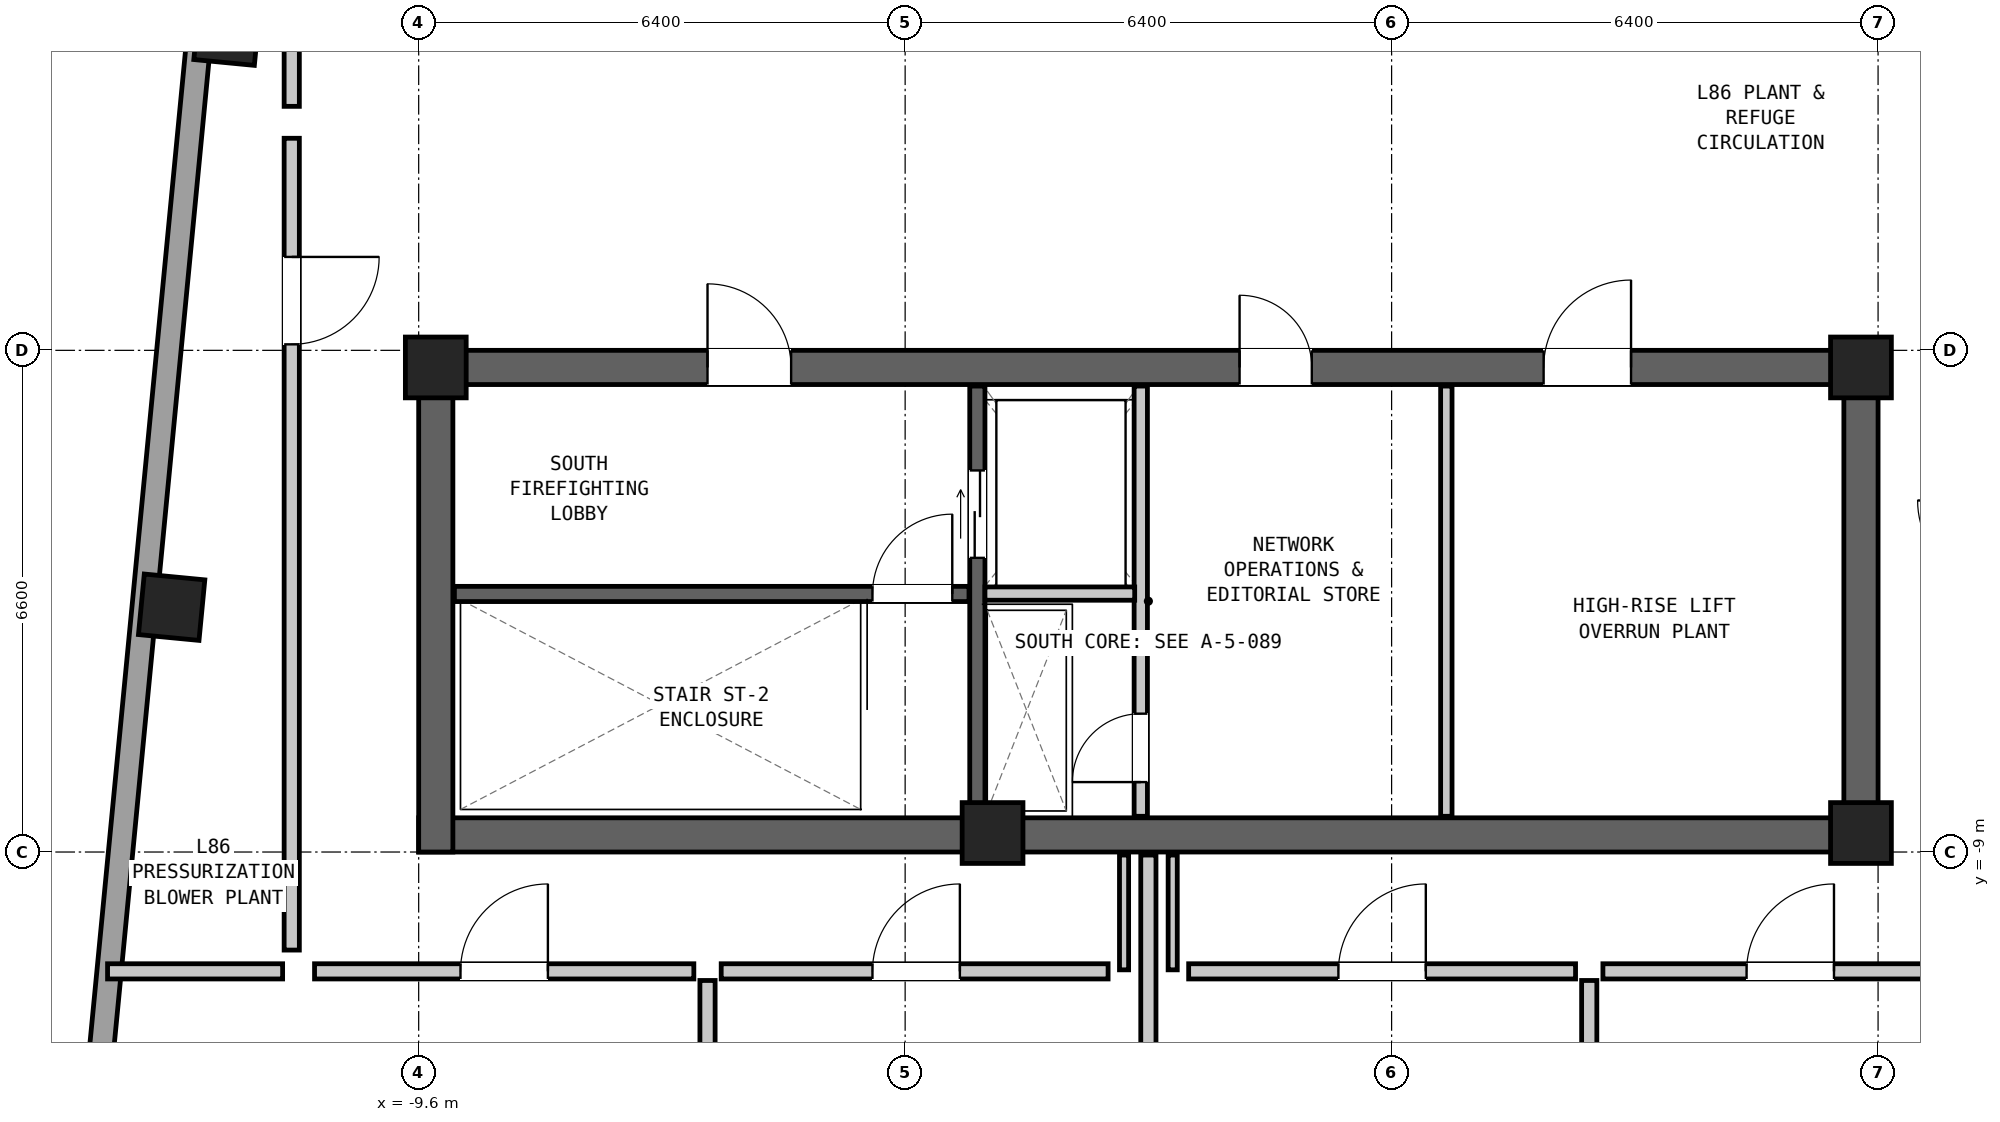
"""IFC4 building model, lengths in metres.
Left out: names, types, materials, properties, quantities, classifications, styles, units other than length and angle.
Written with IfcOpenShell. Run it as: python <this file> out.ifc"""

import sys

from ifc_helpers import new_model, si_unit, direction, frame, frame_2d, origin, origin_2d, place, context, subcontext, project, spatial, rectangle, extrude, element, fill, save


model = new_model("IFC4")
c1 = context("Model", 3, precision=1e-05, world=origin(), true_north=direction((0.0, 1.0)))
c2 = subcontext(c1, "Body", "Model", "MODEL_VIEW")
j1 = project(units=[si_unit("LENGTHUNIT", "METRE"), si_unit("PLANEANGLEUNIT", "RADIAN")], contexts=[c1])
p1 = place(None, origin())
s1 = spatial("IfcSite", under=j1, at=p1, CompositionType="ELEMENT")
p2 = place(p1, origin())
s2 = spatial("IfcBuilding", under=s1, at=p2, CompositionType="ELEMENT")
p3 = place(p2, frame((0.0, 0.0, 292.85)))
s3 = spatial("IfcBuildingStorey", under=s2, at=p3, CompositionType="ELEMENT", Elevation=292.85)
p4 = place(p3, frame((-9.6, -8.775, 0.0), z_axis=(0.0, 0.0, 1.0), x_axis=(1.0, 0.0, 0.0)))
e1 = element("IfcWall", 1, at=p4, inside=s3, PredefinedType="SHEAR", context=c2, shape_type="SweptSolid", body=[
    extrude(rectangle(XDim=19.2, YDim=0.45, at=frame_2d((9.6, 0.0))), origin(), (0.0, 0.0, 1.0), 3.9),
])
p5 = place(p3, frame((-9.6, -2.625, 0.0), z_axis=(0.0, 0.0, 1.0), x_axis=(1.0, 0.0, 0.0)))
e2 = element("IfcWall", 2, at=p5, inside=s3, PredefinedType="SHEAR", context=c2, shape_type="SweptSolid", body=[
    extrude(rectangle(XDim=19.2, YDim=0.45, at=frame_2d((9.6, 0.0))), origin(), (0.0, 0.0, 1.0), 3.9),
])
p6 = place(p5, frame((3.8, 0.0, 0.0)))
e3 = element("IfcOpeningElement", 3, at=p6, cuts=e2, PredefinedType="OPENING", context=c2, shape_type="SweptSolid", body=[
    extrude(rectangle(XDim=1.1, YDim=2.08, at=frame_2d((0.55, 1.04))), frame((0.0, 0.237, 0.0), z_axis=(0.0, -1.0, 0.0), x_axis=(1.0, 0.0, 0.0)), (0.0, 0.0, 1.0), 0.474),
])
p7 = place(p5, frame((10.8, 0.0, 0.0)))
e4 = element("IfcOpeningElement", 4, at=p7, cuts=e2, PredefinedType="OPENING", context=c2, shape_type="SweptSolid", body=[
    extrude(rectangle(XDim=0.95, YDim=2.1, at=frame_2d((0.475, 1.05))), frame((0.0, 0.237, 0.0), z_axis=(0.0, -1.0, 0.0), x_axis=(1.0, 0.0, 0.0)), (0.0, 0.0, 1.0), 0.474),
])
p8 = place(p5, frame((14.8, 0.0, 0.0)))
e5 = element("IfcOpeningElement", 5, at=p8, cuts=e2, PredefinedType="OPENING", context=c2, shape_type="SweptSolid", body=[
    extrude(rectangle(XDim=1.15, YDim=2.1, at=frame_2d((0.575, 1.05))), frame((0.0, 0.237, 0.0), z_axis=(0.0, -1.0, 0.0), x_axis=(1.0, 0.0, 0.0)), (0.0, 0.0, 1.0), 0.474),
])
for number, where, z_axis, x_axis in (
    (6, (-9.375, -9.0, 0.0), (0.0, 0.0, 1.0), (0.0, 1.0, 0.0)),
    (7, (9.375, -9.0, 0.0), (0.0, 0.0, 1.0), (0.0, 1.0, 0.0)),
):
    element("IfcWall", number, at=place(p3, frame(where, z_axis=z_axis, x_axis=x_axis)), inside=s3, PredefinedType="SHEAR", context=c2, shape_type="SweptSolid", body=[
        extrude(rectangle(XDim=6.6, YDim=0.45, at=frame_2d((3.3, 0.0))), origin(), (0.0, 0.0, 1.0), 3.9),
    ])
for number, where, z_axis, x_axis in (
    (8, (-12.122, 1.786, 0.0), (0.0, 0.0, 1.0), (0.096, 0.995, 0.0)),
    (9, (-12.85, -5.779, 0.0), (0.0, 0.0, 1.0), (0.096, 0.995, 0.0)),
    (10, (-9.375, -2.625, 0.0), (0.0, 0.0, 1.0), (1.0, 0.0, 0.0)),
    (11, (9.375, -2.625, 0.0), (0.0, 0.0, 1.0), (1.0, 0.0, 0.0)),
    (12, (-2.05, -8.75, 0.0), (0.0, 0.0, 1.0), (1.0, 0.0, 0.0)),
    (13, (9.375, -8.75, 0.0), (0.0, 0.0, 1.0), (1.0, 0.0, 0.0)),
):
    element("IfcColumn", number, at=place(p3, frame(where, z_axis=z_axis, x_axis=x_axis)), inside=s3, PredefinedType="COLUMN", context=c2, shape_type="SweptSolid", body=[
        extrude(rectangle(XDim=0.8, YDim=0.8, at=origin_2d()), origin(), (0.0, 0.0, 1.0), 3.9),
    ])
p9 = place(p3, frame((-13.9, -12.924, 0.0), z_axis=(0.0, 0.0, 1.0), x_axis=(0.095843788738, 0.995396387456, 0.0)))
e14 = element("IfcWall", 14, at=p9, inside=s3, PredefinedType="SOLIDWALL", context=c2, shape_type="SweptSolid", body=[
    extrude(rectangle(XDim=22.024, YDim=0.32, at=frame_2d((11.012, 0.0))), origin(), (0.0, 0.0, 1.0), 3.214),
])
p10 = place(p3, frame((-9.13, -5.605, 0.0), z_axis=(0.0, 0.0, 1.0), x_axis=(1.0, 0.0, 0.0)))
e15 = element("IfcWall", 15, at=p10, inside=s3, PredefinedType="SHEAR", context=c2, shape_type="SweptSolid", body=[
    extrude(rectangle(XDim=6.77, YDim=0.2, at=frame_2d((3.385, 0.0))), origin(), (0.0, 0.0, 1.0), 3.64),
])
p11 = place(p10, frame((5.5, 0.0, 0.0)))
e16 = element("IfcOpeningElement", 16, at=p11, cuts=e15, PredefinedType="OPENING", context=c2, shape_type="SweptSolid", body=[
    extrude(rectangle(XDim=1.05, YDim=2.08, at=frame_2d((0.525, 1.04))), frame((0.0, 0.112, 0.0), z_axis=(0.0, -1.0, 0.0), x_axis=(1.0, 0.0, 0.0)), (0.0, 0.0, 1.0), 0.224),
])
p12 = place(p3, frame((-2.25, -8.53, 0.0), z_axis=(0.0, 0.0, 1.0), x_axis=(0.0, 1.0, 0.0)))
e17 = element("IfcWall", 17, at=p12, inside=s3, PredefinedType="SHEAR", context=c2, shape_type="SweptSolid", body=[
    extrude(rectangle(XDim=5.66, YDim=0.2, at=frame_2d((2.83, 0.0))), origin(), (0.0, 0.0, 1.0), 3.64),
])
p13 = place(p12, frame((3.4, 0.0, 0.0)))
e18 = element("IfcOpeningElement", 18, at=p13, cuts=e17, PredefinedType="OPENING", context=c2, shape_type="SweptSolid", body=[
    extrude(rectangle(XDim=1.15, YDim=2.08, at=frame_2d((0.575, 1.04))), frame((0.0, 0.112, 0.0), z_axis=(0.0, -1.0, 0.0), x_axis=(1.0, 0.0, 0.0)), (0.0, 0.0, 1.0), 0.224),
])
p14 = place(p3, frame((-0.1, -8.53, 0.0), z_axis=(0.0, 0.0, 1.0), x_axis=(0.0, 1.0, 0.0)))
e19 = element("IfcWall", 19, at=p14, inside=s3, PredefinedType="PARTITIONING", context=c2, shape_type="SweptSolid", body=[
    extrude(rectangle(XDim=5.66, YDim=0.175, at=frame_2d((2.83, 0.0))), origin(), (0.0, 0.0, 1.0), 3.64),
])
p15 = place(p14, frame((0.45, 0.0, 0.0)))
e20 = element("IfcOpeningElement", 20, at=p15, cuts=e19, PredefinedType="OPENING", context=c2, shape_type="SweptSolid", body=[
    extrude(rectangle(XDim=0.9, YDim=2.05, at=frame_2d((0.45, 1.025))), frame((0.0, 0.1, 0.0), z_axis=(0.0, -1.0, 0.0), x_axis=(1.0, 0.0, 0.0)), (0.0, 0.0, 1.0), 0.199),
])
p16 = place(p3, frame((-2.15, -5.6, 0.0), z_axis=(0.0, 0.0, 1.0), x_axis=(1.0, 0.0, 0.0)))
e21 = element("IfcWall", 21, at=p16, inside=s3, PredefinedType="PARTITIONING", context=c2, shape_type="SweptSolid", body=[
    extrude(rectangle(XDim=1.97, YDim=0.175, at=frame_2d((0.985, 0.0))), origin(), (0.0, 0.0, 1.0), 3.64),
])
p17 = place(p3, frame((3.92, -8.53, 0.0), z_axis=(0.0, 0.0, 1.0), x_axis=(0.0, 1.0, 0.0)))
e22 = element("IfcWall", 22, at=p17, inside=s3, PredefinedType="PARTITIONING", context=c2, shape_type="SweptSolid", body=[
    extrude(rectangle(XDim=5.66, YDim=0.15, at=frame_2d((2.83, 0.0))), origin(), (0.0, 0.0, 1.0), 3.64),
])
p18 = place(p3, frame((0.0, -19.755, 0.0), z_axis=(0.0, 0.0, 1.0), x_axis=(0.0, 1.0, 0.0)))
e23 = element("IfcWall", 23, at=p18, inside=s3, PredefinedType="PARTITIONING", context=c2, shape_type="SweptSolid", body=[
    extrude(rectangle(XDim=10.715, YDim=0.2, at=frame_2d((5.358, 0.0))), origin(), (0.0, 0.0, 1.0), 3.161),
])
for number, where, z_axis, x_axis in (
    (24, (-0.32, -10.55, 0.0), (0.0, 0.0, 1.0), (0.0, 1.0, 0.0)),
    (25, (0.32, -10.55, 0.0), (0.0, 0.0, 1.0), (0.0, 1.0, 0.0)),
):
    element("IfcWall", number, at=place(p3, frame(where, z_axis=z_axis, x_axis=x_axis)), inside=s3, PredefinedType="PARTITIONING", context=c2, shape_type="SweptSolid", body=[
        extrude(rectangle(XDim=1.51, YDim=0.12, at=frame_2d((0.755, 0.0))), origin(), (0.0, 0.0, 1.0), 3.161),
    ])
p19 = place(p3, frame((-10.97, -10.57, 0.0), z_axis=(0.0, 0.0, 1.0), x_axis=(1.0, 0.0, 0.0)))
e26 = element("IfcWall", 26, at=p19, inside=s3, PredefinedType="PARTITIONING", context=c2, shape_type="SweptSolid", body=[
    extrude(rectangle(XDim=4.99, YDim=0.2, at=frame_2d((2.495, 0.0))), origin(), (0.0, 0.0, 1.0), 3.64),
])
p20 = place(p19, frame((1.92, 0.0, 0.0)))
e27 = element("IfcOpeningElement", 27, at=p20, cuts=e26, PredefinedType="OPENING", context=c2, shape_type="SweptSolid", body=[
    extrude(rectangle(XDim=1.15, YDim=2.1, at=frame_2d((0.575, 1.05))), frame((0.0, 0.112, 0.0), z_axis=(0.0, -1.0, 0.0), x_axis=(1.0, 0.0, 0.0)), (0.0, 0.0, 1.0), 0.224),
])
p21 = place(p3, frame((-5.8, -19.197, 0.0), z_axis=(0.0, 0.0, 1.0), x_axis=(0.0, 1.0, 0.0)))
e28 = element("IfcWall", 28, at=p21, inside=s3, PredefinedType="PARTITIONING", context=c2, shape_type="SweptSolid", body=[
    extrude(rectangle(XDim=8.507, YDim=0.2, at=frame_2d((4.253, 0.0))), origin(), (0.0, 0.0, 1.0), 3.161),
])
p22 = place(p3, frame((-5.62, -10.57, 0.0), z_axis=(0.0, 0.0, 1.0), x_axis=(1.0, 0.0, 0.0)))
e29 = element("IfcWall", 29, at=p22, inside=s3, PredefinedType="PARTITIONING", context=c2, shape_type="SweptSolid", body=[
    extrude(rectangle(XDim=5.09, YDim=0.2, at=frame_2d((2.545, 0.0))), origin(), (0.0, 0.0, 1.0), 3.64),
])
p23 = place(p22, frame((1.99, 0.0, 0.0)))
e30 = element("IfcOpeningElement", 30, at=p23, cuts=e29, PredefinedType="OPENING", context=c2, shape_type="SweptSolid", body=[
    extrude(rectangle(XDim=1.15, YDim=2.1, at=frame_2d((0.575, 1.05))), frame((0.0, 0.112, 0.0), z_axis=(0.0, -1.0, 0.0), x_axis=(1.0, 0.0, 0.0)), (0.0, 0.0, 1.0), 0.224),
])
p24 = place(p3, frame((0.53, -10.57, 0.0), z_axis=(0.0, 0.0, 1.0), x_axis=(1.0, 0.0, 0.0)))
e31 = element("IfcWall", 31, at=p24, inside=s3, PredefinedType="PARTITIONING", context=c2, shape_type="SweptSolid", body=[
    extrude(rectangle(XDim=5.09, YDim=0.2, at=frame_2d((2.545, 0.0))), origin(), (0.0, 0.0, 1.0), 3.64),
])
p25 = place(p24, frame((1.97, 0.0, 0.0)))
e32 = element("IfcOpeningElement", 32, at=p25, cuts=e31, PredefinedType="OPENING", context=c2, shape_type="SweptSolid", body=[
    extrude(rectangle(XDim=1.15, YDim=2.1, at=frame_2d((0.575, 1.05))), frame((0.0, 0.112, 0.0), z_axis=(0.0, -1.0, 0.0), x_axis=(1.0, 0.0, 0.0)), (0.0, 0.0, 1.0), 0.224),
])
p26 = place(p3, frame((5.8, -20.314, 0.0), z_axis=(0.0, 0.0, 1.0), x_axis=(0.0, 1.0, 0.0)))
e33 = element("IfcWall", 33, at=p26, inside=s3, PredefinedType="PARTITIONING", context=c2, shape_type="SweptSolid", body=[
    extrude(rectangle(XDim=9.624, YDim=0.2, at=frame_2d((4.812, 0.0))), origin(), (0.0, 0.0, 1.0), 3.161),
])
p27 = place(p3, frame((5.98, -10.57, 0.0), z_axis=(0.0, 0.0, 1.0), x_axis=(1.0, 0.0, 0.0)))
e34 = element("IfcWall", 34, at=p27, inside=s3, PredefinedType="PARTITIONING", context=c2, shape_type="SweptSolid", body=[
    extrude(rectangle(XDim=4.99, YDim=0.2, at=frame_2d((2.495, 0.0))), origin(), (0.0, 0.0, 1.0), 3.64),
])
p28 = place(p27, frame((1.89, 0.0, 0.0)))
e35 = element("IfcOpeningElement", 35, at=p28, cuts=e34, PredefinedType="OPENING", context=c2, shape_type="SweptSolid", body=[
    extrude(rectangle(XDim=1.15, YDim=2.1, at=frame_2d((0.575, 1.05))), frame((0.0, 0.112, 0.0), z_axis=(0.0, -1.0, 0.0), x_axis=(1.0, 0.0, 0.0)), (0.0, 0.0, 1.0), 0.224),
])
p29 = place(p3, frame((-13.693, -10.57, 0.0), z_axis=(0.0, 0.0, 1.0), x_axis=(1.0, 0.0, 0.0)))
e36 = element("IfcWall", 36, at=p29, inside=s3, PredefinedType="PARTITIONING", context=c2, shape_type="SweptSolid", body=[
    extrude(rectangle(XDim=2.303, YDim=0.2, at=frame_2d((1.152, 0.0))), origin(), (0.0, 0.0, 1.0), 3.64),
])
p30 = place(p3, frame((-11.27, 0.39, 0.0), z_axis=(0.0, 0.0, 1.0), x_axis=(0.0, -1.0, 0.0)))
e37 = element("IfcWall", 37, at=p30, inside=s3, PredefinedType="PARTITIONING", context=c2, shape_type="SweptSolid", body=[
    extrude(rectangle(XDim=10.68, YDim=0.2, at=frame_2d((5.34, 0.0))), origin(), (0.0, 0.0, 1.0), 3.64),
])
p31 = place(p30, frame((1.561, 0.0, 0.0)))
e38 = element("IfcOpeningElement", 38, at=p31, cuts=e37, PredefinedType="OPENING", context=c2, shape_type="SweptSolid", body=[
    extrude(rectangle(XDim=1.15, YDim=2.1, at=frame_2d((0.575, 1.05))), frame((0.0, 0.112, 0.0), z_axis=(0.0, -1.0, 0.0), x_axis=(1.0, 0.0, 0.0)), (0.0, 0.0, 1.0), 0.224),
])
p32 = place(p3, frame((-11.27, 11.49, 0.0), z_axis=(0.0, 0.0, 1.0), x_axis=(0.0, -1.0, 0.0)))
e39 = element("IfcWall", 39, at=p32, inside=s3, PredefinedType="PARTITIONING", context=c2, shape_type="SweptSolid", body=[
    extrude(rectangle(XDim=10.68, YDim=0.2, at=frame_2d((5.34, 0.0))), origin(), (0.0, 0.0, 1.0), 3.214),
])
p33 = place(p32, frame((4.765, 0.0, 0.0)))
e40 = element("IfcOpeningElement", 40, at=p33, cuts=e39, PredefinedType="OPENING", context=c2, shape_type="SweptSolid", body=[
    extrude(rectangle(XDim=1.15, YDim=2.1, at=frame_2d((0.575, 1.05))), frame((0.0, 0.112, 0.0), z_axis=(0.0, -1.0, 0.0), x_axis=(1.0, 0.0, 0.0)), (0.0, 0.0, 1.0), 0.224),
])
p34 = place(p11, origin())
e41 = element("IfcDoor", 41, at=p34, inside=s3, OperationType="SINGLE_SWING_RIGHT", PredefinedType="DOOR", context=c2, shape_type="SweptSolid", body=[
    extrude(rectangle(XDim=1.05, YDim=2.08, at=frame_2d((0.525, 1.04))), frame((0.0, 0.025, 0.0), z_axis=(0.0, -1.0, 0.0), x_axis=(1.0, 0.0, 0.0)), (0.0, 0.0, 1.0), 0.05),
])
fill(e16, e41)
p35 = place(p6, origin())
e42 = element("IfcDoor", 42, at=p35, inside=s3, OperationType="SINGLE_SWING_LEFT", PredefinedType="DOOR", context=c2, shape_type="SweptSolid", body=[
    extrude(rectangle(XDim=1.1, YDim=2.08, at=frame_2d((0.55, 1.04))), frame((0.0, 0.025, 0.0), z_axis=(0.0, -1.0, 0.0), x_axis=(1.0, 0.0, 0.0)), (0.0, 0.0, 1.0), 0.05),
])
fill(e3, e42)
p36 = place(p13, origin())
e43 = element("IfcDoor", 43, at=p36, inside=s3, OperationType="DOUBLE_DOOR_SLIDING", PredefinedType="DOOR", context=c2, shape_type="SweptSolid", body=[
    extrude(rectangle(XDim=1.15, YDim=2.08, at=frame_2d((0.575, 1.04))), frame((0.0, 0.025, 0.0), z_axis=(0.0, -1.0, 0.0), x_axis=(1.0, 0.0, 0.0)), (0.0, 0.0, 1.0), 0.05),
])
fill(e18, e43)
p37 = place(p15, origin())
e44 = element("IfcDoor", 44, at=p37, inside=s3, OperationType="SINGLE_SWING_LEFT", PredefinedType="DOOR", context=c2, shape_type="SweptSolid", body=[
    extrude(rectangle(XDim=0.9, YDim=2.05, at=frame_2d((0.45, 1.025))), frame((0.0, 0.025, 0.0), z_axis=(0.0, -1.0, 0.0), x_axis=(1.0, 0.0, 0.0)), (0.0, 0.0, 1.0), 0.05),
])
fill(e20, e44)
p38 = place(p7, origin())
e45 = element("IfcDoor", 45, at=p38, inside=s3, OperationType="SINGLE_SWING_LEFT", PredefinedType="DOOR", context=c2, shape_type="SweptSolid", body=[
    extrude(rectangle(XDim=0.95, YDim=2.1, at=frame_2d((0.475, 1.05))), frame((0.0, 0.025, 0.0), z_axis=(0.0, -1.0, 0.0), x_axis=(1.0, 0.0, 0.0)), (0.0, 0.0, 1.0), 0.05),
])
fill(e4, e45)
p39 = place(p8, origin())
e46 = element("IfcDoor", 46, at=p39, inside=s3, OperationType="SINGLE_SWING_RIGHT", PredefinedType="DOOR", context=c2, shape_type="SweptSolid", body=[
    extrude(rectangle(XDim=1.15, YDim=2.1, at=frame_2d((0.575, 1.05))), frame((0.0, 0.025, 0.0), z_axis=(0.0, -1.0, 0.0), x_axis=(1.0, 0.0, 0.0)), (0.0, 0.0, 1.0), 0.05),
])
fill(e5, e46)
p40 = place(p20, origin())
e47 = element("IfcDoor", 47, at=p40, inside=s3, OperationType="SINGLE_SWING_RIGHT", PredefinedType="DOOR", context=c2, shape_type="SweptSolid", body=[
    extrude(rectangle(XDim=1.15, YDim=2.1, at=frame_2d((0.575, 1.05))), frame((0.0, 0.025, 0.0), z_axis=(0.0, -1.0, 0.0), x_axis=(1.0, 0.0, 0.0)), (0.0, 0.0, 1.0), 0.05),
])
fill(e27, e47)
p41 = place(p23, origin())
e48 = element("IfcDoor", 48, at=p41, inside=s3, OperationType="SINGLE_SWING_RIGHT", PredefinedType="DOOR", context=c2, shape_type="SweptSolid", body=[
    extrude(rectangle(XDim=1.15, YDim=2.1, at=frame_2d((0.575, 1.05))), frame((0.0, 0.025, 0.0), z_axis=(0.0, -1.0, 0.0), x_axis=(1.0, 0.0, 0.0)), (0.0, 0.0, 1.0), 0.05),
])
fill(e30, e48)
p42 = place(p25, origin())
e49 = element("IfcDoor", 49, at=p42, inside=s3, OperationType="SINGLE_SWING_RIGHT", PredefinedType="DOOR", context=c2, shape_type="SweptSolid", body=[
    extrude(rectangle(XDim=1.15, YDim=2.1, at=frame_2d((0.575, 1.05))), frame((0.0, 0.025, 0.0), z_axis=(0.0, -1.0, 0.0), x_axis=(1.0, 0.0, 0.0)), (0.0, 0.0, 1.0), 0.05),
])
fill(e32, e49)
p43 = place(p28, origin())
e50 = element("IfcDoor", 50, at=p43, inside=s3, OperationType="SINGLE_SWING_RIGHT", PredefinedType="DOOR", context=c2, shape_type="SweptSolid", body=[
    extrude(rectangle(XDim=1.15, YDim=2.1, at=frame_2d((0.575, 1.05))), frame((0.0, 0.025, 0.0), z_axis=(0.0, -1.0, 0.0), x_axis=(1.0, 0.0, 0.0)), (0.0, 0.0, 1.0), 0.05),
])
fill(e35, e50)
p44 = place(p31, origin())
e51 = element("IfcDoor", 51, at=p44, inside=s3, OperationType="SINGLE_SWING_LEFT", PredefinedType="DOOR", context=c2, shape_type="SweptSolid", body=[
    extrude(rectangle(XDim=1.15, YDim=2.1, at=frame_2d((0.575, 1.05))), frame((0.0, 0.025, 0.0), z_axis=(0.0, -1.0, 0.0), x_axis=(1.0, 0.0, 0.0)), (0.0, 0.0, 1.0), 0.05),
])
fill(e38, e51)
save(model, sys.argv[1])
